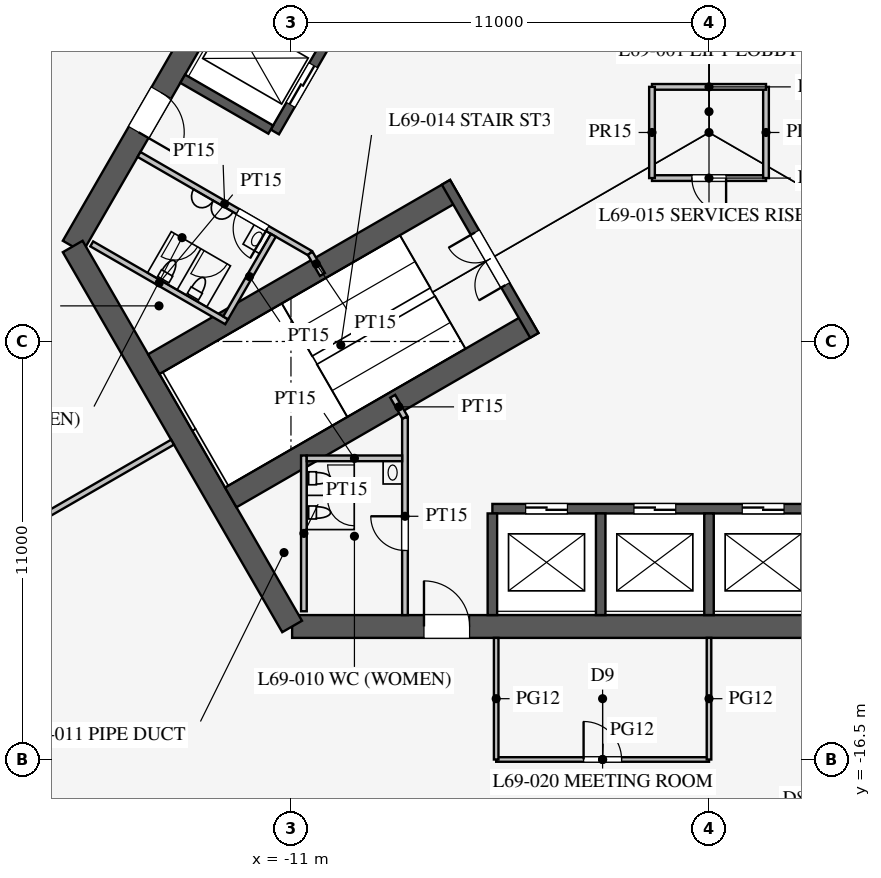
"""IFC4 building model, lengths in metres.
Left out: names, types, materials, properties, quantities, classifications, styles, units other than length and angle.
Written with IfcOpenShell. Run it as: python <this file> out.ifc"""

import sys

from ifc_helpers import new_model, si_unit, direction, frame, frame_2d, origin, place, context, subcontext, project, spatial, rectangle, extrude, element, fill, save


model = new_model("IFC4")
c1 = context("Model", 3, precision=1e-05, world=origin(), true_north=direction((0.0, 1.0)))
c2 = subcontext(c1, "Body", "Model", "MODEL_VIEW")
j1 = project(units=[si_unit("LENGTHUNIT", "METRE"), si_unit("PLANEANGLEUNIT", "RADIAN")], contexts=[c1])
p1 = place(None, origin())
s1 = spatial("IfcSite", under=j1, at=p1, CompositionType="ELEMENT")
p2 = place(p1, origin())
s2 = spatial("IfcBuilding", under=s1, at=p2, CompositionType="ELEMENT")
p3 = place(p2, frame((0.0, 0.0, 301.5)))
s3 = spatial("IfcBuildingStorey", under=s2, at=p3, CompositionType="ELEMENT", Elevation=301.5)
p4 = place(p3, frame((-10.97, -13.0, 0.0), z_axis=(0.0, 0.0, 1.0), x_axis=(1.0, 0.0, 0.0)))
e1 = element("IfcWall", 1, at=p4, inside=s3, PredefinedType="SHEAR", context=c2, shape_type="SweptSolid", body=[
    extrude(rectangle(XDim=21.939, YDim=0.6, at=frame_2d((10.97, 0.0))), origin(), (0.0, 0.0, 1.0), 4.2),
])
p5 = place(p4, frame((17.27, 0.0, 0.0)))
e2 = element("IfcOpeningElement", 2, at=p5, cuts=e1, PredefinedType="OPENING", context=c2, shape_type="SweptSolid", body=[
    extrude(rectangle(XDim=1.2, YDim=2.1, at=frame_2d((0.6, 1.05))), frame((0.0, 0.31, 0.0), z_axis=(0.0, -1.0, 0.0), x_axis=(1.0, 0.0, 0.0)), (0.0, 0.0, 1.0), 0.62),
])
p6 = place(p4, frame((3.47, 0.0, 0.0)))
e3 = element("IfcOpeningElement", 3, at=p6, cuts=e1, PredefinedType="OPENING", context=c2, shape_type="SweptSolid", body=[
    extrude(rectangle(XDim=1.2, YDim=2.1, at=frame_2d((0.6, 1.05))), frame((0.0, 0.31, 0.0), z_axis=(0.0, -1.0, 0.0), x_axis=(1.0, 0.0, 0.0)), (0.0, 0.0, 1.0), 0.62),
])
p7 = place(p3, frame((-5.773, 16.0, 0.0), z_axis=(0.0, 0.0, 1.0), x_axis=(-0.500002442456, -0.866023993627, 0.0)))
e4 = element("IfcWall", 4, at=p7, inside=s3, PredefinedType="SHEAR", context=c2, shape_type="SweptSolid", body=[
    extrude(rectangle(XDim=21.939, YDim=0.6, at=frame_2d((10.97, 0.0))), origin(), (0.0, 0.0, 1.0), 4.2),
])
p8 = place(p7, frame((17.27, 0.0, 0.0)))
e5 = element("IfcOpeningElement", 5, at=p8, cuts=e4, PredefinedType="OPENING", context=c2, shape_type="SweptSolid", body=[
    extrude(rectangle(XDim=1.2, YDim=2.1, at=frame_2d((0.6, 1.05))), frame((0.0, 0.31, 0.0), z_axis=(0.0, -1.0, 0.0), x_axis=(1.0, 0.0, 0.0)), (0.0, 0.0, 1.0), 0.62),
])
p9 = place(p7, frame((3.47, 0.0, 0.0)))
e6 = element("IfcOpeningElement", 6, at=p9, cuts=e4, PredefinedType="OPENING", context=c2, shape_type="SweptSolid", body=[
    extrude(rectangle(XDim=1.2, YDim=2.1, at=frame_2d((0.6, 1.05))), frame((0.0, 0.31, 0.0), z_axis=(0.0, -1.0, 0.0), x_axis=(1.0, 0.0, 0.0)), (0.0, 0.0, 1.0), 0.62),
])
p10 = place(p3, frame((-16.743, -3.0, 0.0), z_axis=(0.0, 0.0, 1.0), x_axis=(0.499995765644, -0.866027848477, 0.0)))
e7 = element("IfcWall", 7, at=p10, inside=s3, PredefinedType="SHEAR", context=c2, shape_type="SweptSolid", body=[
    extrude(rectangle(XDim=11.547, YDim=0.6, at=frame_2d((5.773, 0.0))), origin(), (0.0, 0.0, 1.0), 4.2),
])
p11 = place(p3, frame((-5.7, -9.9, 0.0), z_axis=(0.0, 0.0, 1.0), x_axis=(1.0, 0.0, 0.0)))
e8 = element("IfcWall", 8, at=p11, inside=s3, PredefinedType="SHEAR", context=c2, shape_type="SweptSolid", body=[
    extrude(rectangle(XDim=11.4, YDim=0.25, at=frame_2d((5.7, 0.0))), origin(), (0.0, 0.0, 1.0), 4.2),
])
p12 = place(p11, frame((0.875, 0.0, 0.0)))
e9 = element("IfcOpeningElement", 9, at=p12, cuts=e8, PredefinedType="OPENING", context=c2, shape_type="SweptSolid", body=[
    extrude(rectangle(XDim=1.1, YDim=2.2, at=frame_2d((0.55, 1.1))), frame((0.0, 0.135, 0.0), z_axis=(0.0, -1.0, 0.0), x_axis=(1.0, 0.0, 0.0)), (0.0, 0.0, 1.0), 0.27),
])
p13 = place(p11, frame((3.725, 0.0, 0.0)))
e10 = element("IfcOpeningElement", 10, at=p13, cuts=e8, PredefinedType="OPENING", context=c2, shape_type="SweptSolid", body=[
    extrude(rectangle(XDim=1.1, YDim=2.2, at=frame_2d((0.55, 1.1))), frame((0.0, 0.135, 0.0), z_axis=(0.0, -1.0, 0.0), x_axis=(1.0, 0.0, 0.0)), (0.0, 0.0, 1.0), 0.27),
])
p14 = place(p11, frame((6.575, 0.0, 0.0)))
e11 = element("IfcOpeningElement", 11, at=p14, cuts=e8, PredefinedType="OPENING", context=c2, shape_type="SweptSolid", body=[
    extrude(rectangle(XDim=1.1, YDim=2.2, at=frame_2d((0.55, 1.1))), frame((0.0, 0.135, 0.0), z_axis=(0.0, -1.0, 0.0), x_axis=(1.0, 0.0, 0.0)), (0.0, 0.0, 1.0), 0.27),
])
p15 = place(p11, frame((9.425, 0.0, 0.0)))
e12 = element("IfcOpeningElement", 12, at=p15, cuts=e8, PredefinedType="OPENING", context=c2, shape_type="SweptSolid", body=[
    extrude(rectangle(XDim=1.1, YDim=2.2, at=frame_2d((0.55, 1.1))), frame((0.0, 0.135, 0.0), z_axis=(0.0, -1.0, 0.0), x_axis=(1.0, 0.0, 0.0)), (0.0, 0.0, 1.0), 0.27),
])
for number, where, z_axis, x_axis in (
    (13, (-5.7, -10.025, 0.0), (0.0, 0.0, 1.0), (0.0, -1.0, 0.0)),
    (14, (-2.85, -10.025, 0.0), (0.0, 0.0, 1.0), (0.0, -1.0, 0.0)),
    (15, (0.0, -10.025, 0.0), (0.0, 0.0, 1.0), (0.0, -1.0, 0.0)),
):
    element("IfcWall", number, at=place(p3, frame(where, z_axis=z_axis, x_axis=x_axis)), inside=s3, PredefinedType="SHEAR", context=c2, shape_type="SweptSolid", body=[
        extrude(rectangle(XDim=2.675, YDim=0.25, at=frame_2d((1.337, 0.0))), origin(), (0.0, 0.0, 1.0), 4.2),
    ])
p16 = place(p3, frame((-5.724, 9.886, 0.0), z_axis=(0.0, 0.0, 1.0), x_axis=(-0.500001763848, -0.866024385424, 0.0)))
e16 = element("IfcWall", 16, at=p16, inside=s3, PredefinedType="SHEAR", context=c2, shape_type="SweptSolid", body=[
    extrude(rectangle(XDim=11.4, YDim=0.25, at=frame_2d((5.7, 0.0))), origin(), (0.0, 0.0, 1.0), 4.2),
])
p17 = place(p16, frame((6.525, 0.0, 0.0)))
e17 = element("IfcOpeningElement", 17, at=p17, cuts=e16, PredefinedType="OPENING", context=c2, shape_type="SweptSolid", body=[
    extrude(rectangle(XDim=1.2, YDim=2.2, at=frame_2d((0.6, 1.1))), frame((0.0, 0.135, 0.0), z_axis=(0.0, -1.0, 0.0), x_axis=(1.0, 0.0, 0.0)), (0.0, 0.0, 1.0), 0.27),
])
p18 = place(p16, frame((9.375, 0.0, 0.0)))
e18 = element("IfcOpeningElement", 18, at=p18, cuts=e16, PredefinedType="OPENING", context=c2, shape_type="SweptSolid", body=[
    extrude(rectangle(XDim=1.2, YDim=2.2, at=frame_2d((0.6, 1.1))), frame((0.0, 0.135, 0.0), z_axis=(0.0, -1.0, 0.0), x_axis=(1.0, 0.0, 0.0)), (0.0, 0.0, 1.0), 0.27),
])
p19 = place(p3, frame((-11.532, 0.076, 0.0), z_axis=(0.0, 0.0, 1.0), x_axis=(-0.86604424267, 0.499967368674, 0.0)))
e19 = element("IfcWall", 19, at=p19, inside=s3, PredefinedType="SHEAR", context=c2, shape_type="SweptSolid", body=[
    extrude(rectangle(XDim=2.675, YDim=0.25, at=frame_2d((1.337, 0.0))), origin(), (0.0, 0.0, 1.0), 4.2),
])
p20 = place(p3, frame((-6.663, -1.509, 0.0), z_axis=(0.0, 0.0, 1.0), x_axis=(-0.86603049496, -0.499991181721, 0.0)))
e20 = element("IfcWall", 20, at=p20, inside=s3, PredefinedType="SHEAR", context=c2, shape_type="SweptSolid", body=[
    extrude(rectangle(XDim=9.175, YDim=0.6, at=frame_2d((4.587, 0.0))), origin(), (0.0, 0.0, 1.0), 4.2),
])
p21 = place(p3, frame((-4.638, -5.016, 0.0), z_axis=(0.0, 0.0, 1.0), x_axis=(-0.866012320003, -0.50002266109, 0.0)))
e21 = element("IfcWall", 21, at=p21, inside=s3, PredefinedType="SHEAR", context=c2, shape_type="SweptSolid", body=[
    extrude(rectangle(XDim=9.175, YDim=0.6, at=frame_2d((4.587, 0.0))), origin(), (0.0, 0.0, 1.0), 4.2),
])
p22 = place(p3, frame((-6.922, -1.312, 0.0), z_axis=(0.0, 0.0, 1.0), x_axis=(0.499984536904, -0.866034331223, 0.0)))
e22 = element("IfcWall", 22, at=p22, inside=s3, PredefinedType="SHEAR", context=c2, shape_type="SweptSolid", body=[
    extrude(rectangle(XDim=4.65, YDim=0.25, at=frame_2d((2.325, 0.0))), origin(), (0.0, 0.0, 1.0), 4.2),
])
p23 = place(p22, frame((1.525, 0.0, 0.0)))
e23 = element("IfcOpeningElement", 23, at=p23, cuts=e22, PredefinedType="OPENING", context=c2, shape_type="SweptSolid", body=[
    extrude(rectangle(XDim=1.6, YDim=2.1, at=frame_2d((0.8, 1.05))), frame((0.0, 0.135, 0.0), z_axis=(0.0, -1.0, 0.0), x_axis=(1.0, 0.0, 0.0)), (0.0, 0.0, 1.0), 0.27),
])
p24 = place(p3, frame((-8.0, -7.5, 0.0), z_axis=(0.0, 0.0, 1.0), x_axis=(0.0, -1.0, 0.0)))
e24 = element("IfcWall", 24, at=p24, inside=s3, PredefinedType="PARTITIONING", context=c2, shape_type="SweptSolid", body=[
    extrude(rectangle(XDim=5.2, YDim=0.15, at=frame_2d((2.6, 0.0))), origin(), (0.0, 0.0, 1.0), 4.0),
])
p25 = place(p24, frame((2.6, 0.0, 0.0)))
e25 = element("IfcOpeningElement", 25, at=p25, cuts=e24, PredefinedType="OPENING", context=c2, shape_type="SweptSolid", body=[
    extrude(rectangle(XDim=0.9, YDim=2.1, at=frame_2d((0.45, 1.05))), frame((0.0, 0.085, 0.0), z_axis=(0.0, -1.0, 0.0), x_axis=(1.0, 0.0, 0.0)), (0.0, 0.0, 1.0), 0.17),
])
p26 = place(p3, frame((-10.495, -3.178, 0.0), z_axis=(0.0, 0.0, 1.0), x_axis=(-0.866021400173, 0.500006934395, 0.0)))
e26 = element("IfcWall", 26, at=p26, inside=s3, PredefinedType="PARTITIONING", context=c2, shape_type="SweptSolid", body=[
    extrude(rectangle(XDim=5.2, YDim=0.15, at=frame_2d((2.6, 0.0))), origin(), (0.0, 0.0, 1.0), 4.0),
])
p27 = place(p26, frame((1.3, 0.0, 0.0)))
e27 = element("IfcOpeningElement", 27, at=p27, cuts=e26, PredefinedType="OPENING", context=c2, shape_type="SweptSolid", body=[
    extrude(rectangle(XDim=0.9, YDim=2.1, at=frame_2d((0.45, 1.05))), frame((0.0, 0.085, 0.0), z_axis=(0.0, -1.0, 0.0), x_axis=(1.0, 0.0, 0.0)), (0.0, 0.0, 1.0), 0.17),
])
for number, where, z_axis, x_axis in (
    (28, (-10.495, -3.178, 0.0), (0.0, 0.0, 1.0), (0.5, -0.866, 0.0)),
    (29, (-8.0, -7.5, 0.0), (0.0, 0.0, 1.0), (-0.5, 0.866, 0.0)),
):
    element("IfcWall", number, at=place(p3, frame(where, z_axis=z_axis, x_axis=x_axis)), inside=s3, PredefinedType="PARTITIONING", context=c2, shape_type="SweptSolid", body=[
        extrude(rectangle(XDim=0.645, YDim=0.15, at=frame_2d((0.323, 0.0))), origin(), (0.0, 0.0, 1.0), 4.0),
    ])
p28 = place(p3, frame((-12.691, -4.982, 0.0), z_axis=(0.0, 0.0, 1.0), x_axis=(-0.8660249478, 0.500000789788, 0.0)))
e30 = element("IfcWall", 30, at=p28, inside=s3, PredefinedType="PARTITIONING", context=c2, shape_type="SweptSolid", body=[
    extrude(rectangle(XDim=4.1, YDim=0.15, at=frame_2d((2.05, 0.0))), origin(), (0.0, 0.0, 1.0), 4.0),
])
p29 = place(p3, frame((-11.464, -2.706, 0.0), z_axis=(0.0, 0.0, 1.0), x_axis=(-0.50001992892, -0.866013897511, 0.0)))
e31 = element("IfcWall", 31, at=p29, inside=s3, PredefinedType="PARTITIONING", context=c2, shape_type="SweptSolid", body=[
    extrude(rectangle(XDim=2.51, YDim=0.15, at=frame_2d((1.255, 0.0))), origin(), (0.0, 0.0, 1.0), 4.0),
])
p30 = place(p3, frame((-10.66, -8.5, 0.0), z_axis=(0.0, 0.0, 1.0), x_axis=(0.0, -1.0, 0.0)))
e32 = element("IfcWall", 32, at=p30, inside=s3, PredefinedType="PARTITIONING", context=c2, shape_type="SweptSolid", body=[
    extrude(rectangle(XDim=4.1, YDim=0.15, at=frame_2d((2.05, 0.0))), origin(), (0.0, 0.0, 1.0), 4.0),
])
p31 = place(p3, frame((-8.075, -8.575, 0.0), z_axis=(0.0, 0.0, 1.0), x_axis=(-1.0, 0.0, 0.0)))
e33 = element("IfcWall", 33, at=p31, inside=s3, PredefinedType="PARTITIONING", context=c2, shape_type="SweptSolid", body=[
    extrude(rectangle(XDim=2.51, YDim=0.15, at=frame_2d((1.255, 0.0))), origin(), (0.0, 0.0, 1.0), 4.0),
])
p32 = place(p3, frame((-1.5, -1.2, 0.0), z_axis=(0.0, 0.0, 1.0), x_axis=(1.0, 0.0, 0.0)))
e34 = element("IfcWall", 34, at=p32, inside=s3, PredefinedType="PARTITIONING", context=c2, shape_type="SweptSolid", body=[
    extrude(rectangle(XDim=3.0, YDim=0.15, at=frame_2d((1.5, 0.0))), origin(), (0.0, 0.0, 1.0), 4.0),
])
p33 = place(p32, frame((1.05, 0.0, 0.0)))
e35 = element("IfcOpeningElement", 35, at=p33, cuts=e34, PredefinedType="OPENING", context=c2, shape_type="SweptSolid", body=[
    extrude(rectangle(XDim=0.9, YDim=2.1, at=frame_2d((0.45, 1.05))), frame((0.0, 0.085, 0.0), z_axis=(0.0, -1.0, 0.0), x_axis=(1.0, 0.0, 0.0)), (0.0, 0.0, 1.0), 0.17),
])
p34 = place(p3, frame((1.5, -1.2, 0.0), z_axis=(0.0, 0.0, 1.0), x_axis=(0.0, 1.0, 0.0)))
e36 = element("IfcWall", 36, at=p34, inside=s3, PredefinedType="PARTITIONING", context=c2, shape_type="SweptSolid", body=[
    extrude(rectangle(XDim=2.4, YDim=0.15, at=frame_2d((1.2, 0.0))), origin(), (0.0, 0.0, 1.0), 4.0),
])
p35 = place(p3, frame((1.5, 1.2, 0.0), z_axis=(0.0, 0.0, 1.0), x_axis=(-1.0, 0.0, 0.0)))
e37 = element("IfcWall", 37, at=p35, inside=s3, PredefinedType="PARTITIONING", context=c2, shape_type="SweptSolid", body=[
    extrude(rectangle(XDim=3.0, YDim=0.15, at=frame_2d((1.5, 0.0))), origin(), (0.0, 0.0, 1.0), 4.0),
])
p36 = place(p3, frame((-1.5, 1.2, 0.0), z_axis=(0.0, 0.0, 1.0), x_axis=(0.0, -1.0, 0.0)))
e38 = element("IfcWall", 38, at=p36, inside=s3, PredefinedType="PARTITIONING", context=c2, shape_type="SweptSolid", body=[
    extrude(rectangle(XDim=2.4, YDim=0.15, at=frame_2d((1.2, 0.0))), origin(), (0.0, 0.0, 1.0), 4.0),
])
p37 = place(p3, frame((-14.116, -8.15, 0.0), z_axis=(0.0, 0.0, 1.0), x_axis=(-0.866020541135, -0.500008422262, 0.0)))
e39 = element("IfcWall", 39, at=p37, inside=s3, PredefinedType="PARTITIONING", context=c2, shape_type="SweptSolid", body=[
    extrude(rectangle(XDim=13.45, YDim=0.15, at=frame_2d((6.725, 0.0))), origin(), (0.0, 0.0, 1.0), 2.5),
])
p38 = place(p3, frame((-5.6, -16.5, 0.0), z_axis=(0.0, 0.0, 1.0), x_axis=(1.0, 0.0, 0.0)))
e40 = element("IfcWall", 40, at=p38, inside=s3, PredefinedType="PARTITIONING", context=c2, shape_type="SweptSolid", body=[
    extrude(rectangle(XDim=5.6, YDim=0.12, at=frame_2d((2.8, 0.0))), origin(), (0.0, 0.0, 1.0), 2.9),
])
p39 = place(p38, frame((2.3, 0.0, 0.15)))
e41 = element("IfcOpeningElement", 41, at=p39, cuts=e40, PredefinedType="OPENING", context=c2, shape_type="SweptSolid", body=[
    extrude(rectangle(XDim=1.0, YDim=2.1, at=frame_2d((0.5, 1.05))), frame((0.0, 0.07, 0.0), z_axis=(0.0, -1.0, 0.0), x_axis=(1.0, 0.0, 0.0)), (0.0, 0.0, 1.0), 0.14),
])
for number, where, z_axis, x_axis in (
    (42, (0.0, -13.3, 0.0), (0.0, 0.0, 1.0), (0.0, -1.0, 0.0)),
    (43, (-5.6, -13.3, 0.0), (0.0, 0.0, 1.0), (0.0, -1.0, 0.0)),
):
    element("IfcWall", number, at=place(p3, frame(where, z_axis=z_axis, x_axis=x_axis)), inside=s3, PredefinedType="PARTITIONING", context=c2, shape_type="SweptSolid", body=[
        extrude(rectangle(XDim=3.2, YDim=0.12, at=frame_2d((1.6, 0.0))), origin(), (0.0, 0.0, 1.0), 2.9),
    ])
p40 = place(p3, frame((25.968, -14.657, 0.0), z_axis=(0.0, 0.0, 1.0), x_axis=(-0.500000361757, 0.866025194924, 0.0)))
e44 = element("IfcWall", 44, at=p40, inside=s3, PredefinedType="PARTITIONING", context=c2, shape_type="SweptSolid", body=[
    extrude(rectangle(XDim=51.355, YDim=0.12, at=frame_2d((25.678, 0.0))), origin(), (0.0, 0.0, 1.0), 2.9),
])
p41 = place(p40, frame((9.9, 0.0, 0.15)))
e45 = element("IfcOpeningElement", 45, at=p41, cuts=e44, PredefinedType="OPENING", context=c2, shape_type="SweptSolid", body=[
    extrude(rectangle(XDim=1.8, YDim=2.1, at=frame_2d((0.9, 1.05))), frame((0.0, 0.07, 0.0), z_axis=(0.0, -1.0, 0.0), x_axis=(1.0, 0.0, 0.0)), (0.0, 0.0, 1.0), 0.14),
])
p42 = place(p40, frame((39.65, 0.0, 0.15)))
e46 = element("IfcOpeningElement", 46, at=p42, cuts=e44, PredefinedType="OPENING", context=c2, shape_type="SweptSolid", body=[
    extrude(rectangle(XDim=1.8, YDim=2.1, at=frame_2d((0.9, 1.05))), frame((0.0, 0.07, 0.0), z_axis=(0.0, -1.0, 0.0), x_axis=(1.0, 0.0, 0.0)), (0.0, 0.0, 1.0), 0.14),
])
p43 = place(p25, frame((0.9, 0.0, 0.0), z_axis=(0.0, 0.0, 1.0), x_axis=(-1.0, 0.0, 0.0)))
e47 = element("IfcDoor", 47, at=p43, inside=s3, OperationType="SINGLE_SWING_RIGHT", PredefinedType="DOOR", context=c2, shape_type="SweptSolid", body=[
    extrude(rectangle(XDim=0.9, YDim=2.1, at=frame_2d((0.45, 1.05))), frame((0.0, 0.025, 0.0), z_axis=(0.0, -1.0, 0.0), x_axis=(1.0, 0.0, 0.0)), (0.0, 0.0, 1.0), 0.05),
])
fill(e25, e47)
p44 = place(p27, origin())
e48 = element("IfcDoor", 48, at=p44, inside=s3, OperationType="SINGLE_SWING_LEFT", PredefinedType="DOOR", context=c2, shape_type="SweptSolid", body=[
    extrude(rectangle(XDim=0.9, YDim=2.1, at=frame_2d((0.45, 1.05))), frame((0.0, 0.025, 0.0), z_axis=(0.0, -1.0, 0.0), x_axis=(1.0, 0.0, 0.0)), (0.0, 0.0, 1.0), 0.05),
])
fill(e27, e48)
p45 = place(p33, frame((0.9, 0.0, 0.0), z_axis=(0.0, 0.0, 1.0), x_axis=(-1.0, 0.0, 0.0)))
e49 = element("IfcDoor", 49, at=p45, inside=s3, OperationType="SINGLE_SWING_LEFT", PredefinedType="DOOR", context=c2, shape_type="SweptSolid", body=[
    extrude(rectangle(XDim=0.9, YDim=2.1, at=frame_2d((0.45, 1.05))), frame((0.0, 0.025, 0.0), z_axis=(0.0, -1.0, 0.0), x_axis=(1.0, 0.0, 0.0)), (0.0, 0.0, 1.0), 0.05),
])
fill(e35, e49)
p46 = place(p23, frame((1.6, 0.0, 0.0), z_axis=(0.0, 0.0, 1.0), x_axis=(-1.0, 0.0, 0.0)))
e50 = element("IfcDoor", 50, at=p46, inside=s3, OperationType="DOUBLE_DOOR_SINGLE_SWING", PredefinedType="DOOR", context=c2, shape_type="SweptSolid", body=[
    extrude(rectangle(XDim=1.6, YDim=2.1, at=frame_2d((0.8, 1.05))), frame((0.0, 0.025, 0.0), z_axis=(0.0, -1.0, 0.0), x_axis=(1.0, 0.0, 0.0)), (0.0, 0.0, 1.0), 0.05),
])
fill(e23, e50)
p47 = place(p6, origin())
e51 = element("IfcDoor", 51, at=p47, inside=s3, OperationType="SINGLE_SWING_LEFT", PredefinedType="DOOR", context=c2, shape_type="SweptSolid", body=[
    extrude(rectangle(XDim=1.2, YDim=2.1, at=frame_2d((0.6, 1.05))), frame((0.0, 0.025, 0.0), z_axis=(0.0, -1.0, 0.0), x_axis=(1.0, 0.0, 0.0)), (0.0, 0.0, 1.0), 0.05),
])
fill(e3, e51)
p48 = place(p8, origin())
e52 = element("IfcDoor", 52, at=p48, inside=s3, OperationType="SINGLE_SWING_RIGHT", PredefinedType="DOOR", context=c2, shape_type="SweptSolid", body=[
    extrude(rectangle(XDim=1.2, YDim=2.1, at=frame_2d((0.6, 1.05))), frame((0.0, 0.025, 0.0), z_axis=(0.0, -1.0, 0.0), x_axis=(1.0, 0.0, 0.0)), (0.0, 0.0, 1.0), 0.05),
])
fill(e5, e52)
p49 = place(p39, origin())
e53 = element("IfcDoor", 53, at=p49, inside=s3, OperationType="SINGLE_SWING_LEFT", PredefinedType="DOOR", context=c2, shape_type="SweptSolid", body=[
    extrude(rectangle(XDim=1.0, YDim=2.1, at=frame_2d((0.5, 1.05))), frame((0.0, 0.025, 0.0), z_axis=(0.0, -1.0, 0.0), x_axis=(1.0, 0.0, 0.0)), (0.0, 0.0, 1.0), 0.05),
])
fill(e41, e53)
p50 = place(p12, origin())
e54 = element("IfcDoor", 54, at=p50, inside=s3, OperationType="DOUBLE_DOOR_SLIDING", PredefinedType="DOOR", context=c2, shape_type="SweptSolid", body=[
    extrude(rectangle(XDim=1.1, YDim=2.2, at=frame_2d((0.55, 1.1))), frame((0.0, 0.025, 0.0), z_axis=(0.0, -1.0, 0.0), x_axis=(1.0, 0.0, 0.0)), (0.0, 0.0, 1.0), 0.05),
])
fill(e9, e54)
p51 = place(p13, origin())
e55 = element("IfcDoor", 55, at=p51, inside=s3, OperationType="DOUBLE_DOOR_SLIDING", PredefinedType="DOOR", context=c2, shape_type="SweptSolid", body=[
    extrude(rectangle(XDim=1.1, YDim=2.2, at=frame_2d((0.55, 1.1))), frame((0.0, 0.025, 0.0), z_axis=(0.0, -1.0, 0.0), x_axis=(1.0, 0.0, 0.0)), (0.0, 0.0, 1.0), 0.05),
])
fill(e10, e55)
p52 = place(p14, origin())
e56 = element("IfcDoor", 56, at=p52, inside=s3, OperationType="DOUBLE_DOOR_SLIDING", PredefinedType="DOOR", context=c2, shape_type="SweptSolid", body=[
    extrude(rectangle(XDim=1.1, YDim=2.2, at=frame_2d((0.55, 1.1))), frame((0.0, 0.025, 0.0), z_axis=(0.0, -1.0, 0.0), x_axis=(1.0, 0.0, 0.0)), (0.0, 0.0, 1.0), 0.05),
])
fill(e11, e56)
p53 = place(p18, origin())
e57 = element("IfcDoor", 57, at=p53, inside=s3, OperationType="DOUBLE_DOOR_SLIDING", PredefinedType="DOOR", context=c2, shape_type="SweptSolid", body=[
    extrude(rectangle(XDim=1.2, YDim=2.2, at=frame_2d((0.6, 1.1))), frame((0.0, 0.025, 0.0), z_axis=(0.0, -1.0, 0.0), x_axis=(1.0, 0.0, 0.0)), (0.0, 0.0, 1.0), 0.05),
])
fill(e18, e57)
save(model, sys.argv[1])
